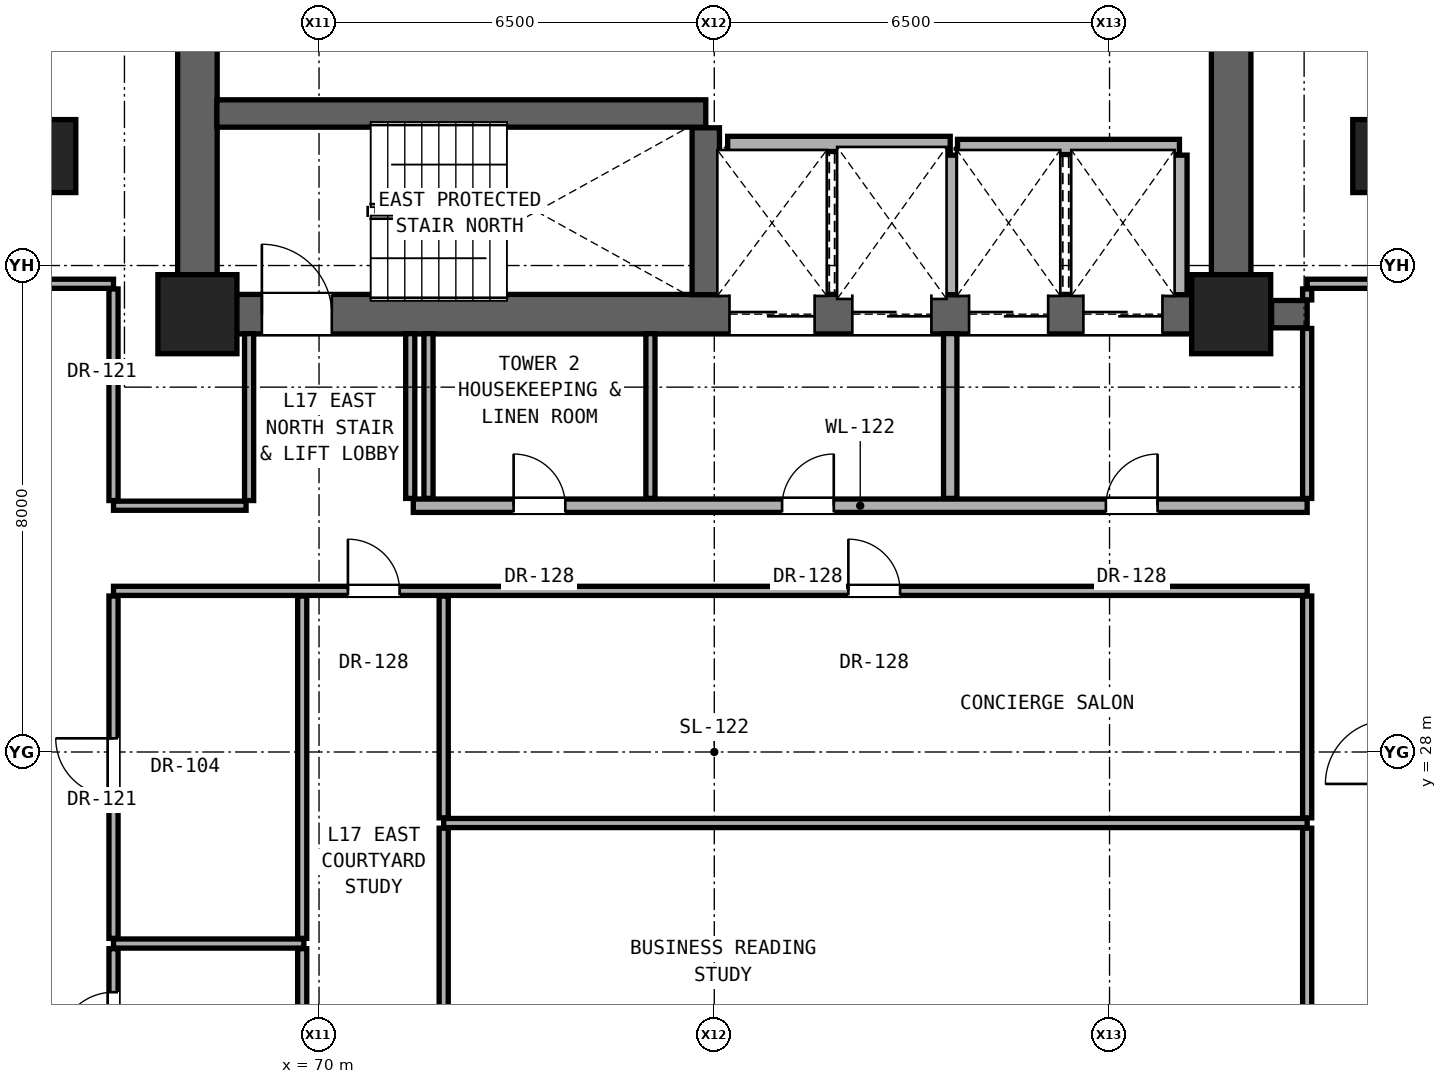
"""IFC4 building model, lengths in metres.
Left out: names, types, materials, properties, quantities, classifications, styles, units other than length and angle.
Written with IfcOpenShell. Run it as: python <this file> out.ifc"""

import sys

from ifc_helpers import new_model, si_unit, direction, frame, frame_2d, origin, origin_2d, place, context, subcontext, project, spatial, rectangle, extrude, element, fill, save


model = new_model("IFC4")
c1 = context("Model", 3, precision=1e-05, world=origin(), true_north=direction((0.0, 1.0)))
c2 = subcontext(c1, "Body", "Model", "MODEL_VIEW")
j1 = project(units=[si_unit("LENGTHUNIT", "METRE"), si_unit("PLANEANGLEUNIT", "RADIAN")], contexts=[c1])
p1 = place(None, origin())
s1 = spatial("IfcSite", under=j1, at=p1, CompositionType="ELEMENT")
p2 = place(p1, origin())
s2 = spatial("IfcBuilding", under=s1, at=p2, CompositionType="ELEMENT")
p3 = place(p2, frame((0.0, 0.0, 62.0)))
s3 = spatial("IfcBuildingStorey", under=s2, at=p3, CompositionType="ELEMENT", Elevation=62.0)
for number, where, z_axis, x_axis in (
    (1, (68.0, 35.2, 0.0), (0.0, 0.0, 1.0), (1.0, 0.0, 0.0)),
    (2, (85.0, 35.2, 0.0), (0.0, 0.0, 1.0), (1.0, 0.0, 0.0)),
):
    element("IfcColumn", number, at=place(p3, frame(where, z_axis=z_axis, x_axis=x_axis)), inside=s3, PredefinedType="COLUMN", context=c2, shape_type="SweptSolid", body=[
        extrude(rectangle(XDim=1.3, YDim=1.3, at=origin_2d()), origin(), (0.0, 0.0, 1.0), 3.3),
    ])
for number, where, z_axis, x_axis in (
    (3, (65.6, 37.8, 0.0), (0.0, 0.0, 1.0), (1.0, 0.0, 0.0)),
    (4, (87.4, 37.8, 0.0), (0.0, 0.0, 1.0), (1.0, 0.0, 0.0)),
):
    element("IfcColumn", number, at=place(p3, frame(where, z_axis=z_axis, x_axis=x_axis)), inside=s3, PredefinedType="PILASTER", context=c2, shape_type="SweptSolid", body=[
        extrude(rectangle(XDim=0.8, YDim=1.2, at=origin_2d()), origin(), (0.0, 0.0, 1.0), 3.3),
    ])
for number, where, z_axis, x_axis in (
    (5, (68.0, 35.2, 0.0), (0.0, 0.0, 1.0), (0.0, 1.0, 0.0)),
    (6, (85.0, 35.2, 0.0), (0.0, 0.0, 1.0), (0.0, 1.0, 0.0)),
):
    element("IfcWall", number, at=place(p3, frame(where, z_axis=z_axis, x_axis=x_axis)), inside=s3, PredefinedType="SHEAR", context=c2, shape_type="SweptSolid", body=[
        extrude(rectangle(XDim=5.6, YDim=0.65, at=frame_2d((2.8, 0.0))), origin(), (0.0, 0.0, 1.0), 3.06),
    ])
p4 = place(p3, frame((68.0, 35.2, 0.0), z_axis=(0.0, 0.0, 1.0), x_axis=(1.0, 0.0, 0.0)))
e7 = element("IfcWall", 7, at=p4, inside=s3, PredefinedType="SHEAR", context=c2, shape_type="SweptSolid", body=[
    extrude(rectangle(XDim=17.0, YDim=0.65, at=frame_2d((8.5, 0.0))), origin(), (0.0, 0.0, 1.0), 3.06),
])
p5 = place(p4, frame((1.06, 0.0, 0.0)))
e8 = element("IfcOpeningElement", 8, at=p5, cuts=e7, PredefinedType="OPENING", context=c2, shape_type="SweptSolid", body=[
    extrude(rectangle(XDim=1.15, YDim=2.2, at=frame_2d((0.575, 1.1))), frame((0.0, 0.335, 0.0), z_axis=(0.0, -1.0, 0.0), x_axis=(1.0, 0.0, 0.0)), (0.0, 0.0, 1.0), 0.67),
])
p6 = place(p4, frame((8.75, 0.0, 0.0)))
e9 = element("IfcOpeningElement", 9, at=p6, cuts=e7, PredefinedType="OPENING", context=c2, shape_type="SweptSolid", body=[
    extrude(rectangle(XDim=1.4, YDim=2.35, at=frame_2d((0.7, 1.175))), frame((0.0, 0.335, 0.0), z_axis=(0.0, -1.0, 0.0), x_axis=(1.0, 0.0, 0.0)), (0.0, 0.0, 1.0), 0.67),
])
p7 = place(p4, frame((10.77, 0.0, 0.0)))
e10 = element("IfcOpeningElement", 10, at=p7, cuts=e7, PredefinedType="OPENING", context=c2, shape_type="SweptSolid", body=[
    extrude(rectangle(XDim=1.3, YDim=2.3, at=frame_2d((0.65, 1.15))), frame((0.0, 0.335, 0.0), z_axis=(0.0, -1.0, 0.0), x_axis=(1.0, 0.0, 0.0)), (0.0, 0.0, 1.0), 0.67),
])
p8 = place(p4, frame((12.69, 0.0, 0.0)))
e11 = element("IfcOpeningElement", 11, at=p8, cuts=e7, PredefinedType="OPENING", context=c2, shape_type="SweptSolid", body=[
    extrude(rectangle(XDim=1.3, YDim=2.3, at=frame_2d((0.65, 1.15))), frame((0.0, 0.335, 0.0), z_axis=(0.0, -1.0, 0.0), x_axis=(1.0, 0.0, 0.0)), (0.0, 0.0, 1.0), 0.67),
])
p9 = place(p4, frame((14.57, 0.0, 0.0)))
e12 = element("IfcOpeningElement", 12, at=p9, cuts=e7, PredefinedType="OPENING", context=c2, shape_type="SweptSolid", body=[
    extrude(rectangle(XDim=1.3, YDim=2.3, at=frame_2d((0.65, 1.15))), frame((0.0, 0.335, 0.0), z_axis=(0.0, -1.0, 0.0), x_axis=(1.0, 0.0, 0.0)), (0.0, 0.0, 1.0), 0.67),
])
p10 = place(p3, frame((66.62, 24.85, 0.0), z_axis=(0.0, 0.0, 1.0), x_axis=(1.0, 0.0, 0.0)))
e13 = element("IfcWall", 13, at=p10, inside=s3, PredefinedType="PARTITIONING", context=c2, shape_type="SweptSolid", body=[
    extrude(rectangle(XDim=3.13, YDim=0.15, at=frame_2d((1.565, 0.0))), origin(), (0.0, 0.0, 1.0), 2.125),
])
p11 = place(p3, frame((72.05, 26.832, 0.0), z_axis=(0.0, 0.0, 1.0), x_axis=(1.0, 0.0, 0.0)))
e14 = element("IfcWall", 14, at=p11, inside=s3, PredefinedType="PARTITIONING", context=c2, shape_type="SweptSolid", body=[
    extrude(rectangle(XDim=14.2, YDim=0.15, at=frame_2d((7.1, 0.0))), origin(), (0.0, 0.0, 1.0), 2.125),
])
p12 = place(p3, frame((66.62, 30.65, 0.0), z_axis=(0.0, 0.0, 1.0), x_axis=(1.0, 0.0, 0.0)))
e15 = element("IfcWall", 15, at=p12, inside=s3, PredefinedType="PARTITIONING", context=c2, shape_type="SweptSolid", body=[
    extrude(rectangle(XDim=19.63, YDim=0.15, at=frame_2d((9.815, 0.0))), origin(), (0.0, 0.0, 1.0), 2.125),
])
p13 = place(p12, frame((3.855, 0.0, 0.0)))
e16 = element("IfcOpeningElement", 16, at=p13, cuts=e15, PredefinedType="OPENING", context=c2, shape_type="SweptSolid", body=[
    extrude(rectangle(XDim=0.85, YDim=2.01, at=frame_2d((0.425, 1.005))), frame((0.0, 0.085, 0.0), z_axis=(0.0, -1.0, 0.0), x_axis=(1.0, 0.0, 0.0)), (0.0, 0.0, 1.0), 0.17),
])
p14 = place(p12, frame((12.085, 0.0, 0.0)))
e17 = element("IfcOpeningElement", 17, at=p14, cuts=e15, PredefinedType="OPENING", context=c2, shape_type="SweptSolid", body=[
    extrude(rectangle(XDim=0.85, YDim=2.01, at=frame_2d((0.425, 1.005))), frame((0.0, 0.085, 0.0), z_axis=(0.0, -1.0, 0.0), x_axis=(1.0, 0.0, 0.0)), (0.0, 0.0, 1.0), 0.17),
])
p15 = place(p3, frame((66.62, 32.05, 0.0), z_axis=(0.0, 0.0, 1.0), x_axis=(1.0, 0.0, 0.0)))
e18 = element("IfcWall", 18, at=p15, inside=s3, PredefinedType="PARTITIONING", context=c2, shape_type="SweptSolid", body=[
    extrude(rectangle(XDim=2.18, YDim=0.15, at=frame_2d((1.09, 0.0))), origin(), (0.0, 0.0, 1.0), 2.125),
])
p16 = place(p3, frame((71.55, 32.05, 0.0), z_axis=(0.0, 0.0, 1.0), x_axis=(1.0, 0.0, 0.0)))
e19 = element("IfcWall", 19, at=p16, inside=s3, PredefinedType="SOLIDWALL", context=c2, shape_type="SweptSolid", body=[
    extrude(rectangle(XDim=14.7, YDim=0.22, at=frame_2d((7.35, 0.0))), origin(), (0.0, 0.0, 1.0), 2.125),
])
p17 = place(p16, frame((11.39, 0.0, 0.0)))
e20 = element("IfcOpeningElement", 20, at=p17, cuts=e19, PredefinedType="OPENING", context=c2, shape_type="SweptSolid", body=[
    extrude(rectangle(XDim=0.85, YDim=2.01, at=frame_2d((0.425, 1.005))), frame((0.0, 0.12, 0.0), z_axis=(0.0, -1.0, 0.0), x_axis=(1.0, 0.0, 0.0)), (0.0, 0.0, 1.0), 0.24),
])
p18 = place(p16, frame((6.065, 0.0, 0.0)))
e21 = element("IfcOpeningElement", 21, at=p18, cuts=e19, PredefinedType="OPENING", context=c2, shape_type="SweptSolid", body=[
    extrude(rectangle(XDim=0.85, YDim=2.01, at=frame_2d((0.425, 1.005))), frame((0.0, 0.12, 0.0), z_axis=(0.0, -1.0, 0.0), x_axis=(1.0, 0.0, 0.0)), (0.0, 0.0, 1.0), 0.24),
])
p19 = place(p16, frame((1.65, 0.0, 0.0)))
e22 = element("IfcOpeningElement", 22, at=p19, cuts=e19, PredefinedType="OPENING", context=c2, shape_type="SweptSolid", body=[
    extrude(rectangle(XDim=0.85, YDim=2.01, at=frame_2d((0.425, 1.005))), frame((0.0, 0.12, 0.0), z_axis=(0.0, -1.0, 0.0), x_axis=(1.0, 0.0, 0.0)), (0.0, 0.0, 1.0), 0.24),
])
p20 = place(p3, frame((85.665, 35.2, 0.0), z_axis=(0.0, 0.0, 1.0), x_axis=(1.0, 0.0, 0.0)))
e23 = element("IfcWall", 23, at=p20, inside=s3, PredefinedType="SHEAR", context=c2, shape_type="SweptSolid", body=[
    extrude(rectangle(XDim=0.585, YDim=0.45, at=frame_2d((0.292, 0.0))), origin(), (0.0, 0.0, 1.0), 3.06),
])
p21 = place(p3, frame((65.25, 35.7, 0.0), z_axis=(0.0, 0.0, 1.0), x_axis=(1.0, 0.0, 0.0)))
e24 = element("IfcWall", 24, at=p21, inside=s3, PredefinedType="PARTITIONING", context=c2, shape_type="SweptSolid", body=[
    extrude(rectangle(XDim=1.37, YDim=0.15, at=frame_2d((0.685, 0.0))), origin(), (0.0, 0.0, 1.0), 3.06),
])
p22 = place(p3, frame((86.25, 35.7, 0.0), z_axis=(0.0, 0.0, 1.0), x_axis=(1.0, 0.0, 0.0)))
e25 = element("IfcWall", 25, at=p22, inside=s3, PredefinedType="PARTITIONING", context=c2, shape_type="SweptSolid", body=[
    extrude(rectangle(XDim=1.35, YDim=0.15, at=frame_2d((0.675, 0.0))), origin(), (0.0, 0.0, 1.0), 3.06),
])
p23 = place(p3, frame((80.5, 37.95, 0.0), z_axis=(0.0, 0.0, 1.0), x_axis=(1.0, 0.0, 0.0)))
e26 = element("IfcWall", 26, at=p23, inside=s3, PredefinedType="SOLIDWALL", context=c2, shape_type="SweptSolid", body=[
    extrude(rectangle(XDim=3.65, YDim=0.25, at=frame_2d((1.825, 0.0))), origin(), (0.0, 0.0, 1.0), 3.06),
])
p24 = place(p3, frame((76.72, 38.0, 0.0), z_axis=(0.0, 0.0, 1.0), x_axis=(1.0, 0.0, 0.0)))
e27 = element("IfcWall", 27, at=p24, inside=s3, PredefinedType="SOLIDWALL", context=c2, shape_type="SweptSolid", body=[
    extrude(rectangle(XDim=3.66, YDim=0.25, at=frame_2d((1.83, 0.0))), origin(), (0.0, 0.0, 1.0), 3.06),
])
p25 = place(p3, frame((68.32, 38.5, 0.0), z_axis=(0.0, 0.0, 1.0), x_axis=(1.0, 0.0, 0.0)))
e28 = element("IfcWall", 28, at=p25, inside=s3, PredefinedType="SHEAR", context=c2, shape_type="SweptSolid", body=[
    extrude(rectangle(XDim=8.04, YDim=0.45, at=frame_2d((4.02, 0.0))), origin(), (0.0, 0.0, 1.0), 3.06),
])
p26 = place(p3, frame((66.62, 22.435, 0.0), z_axis=(0.0, 0.0, 1.0), x_axis=(0.0, 1.0, 0.0)))
e29 = element("IfcWall", 29, at=p26, inside=s3, PredefinedType="PARTITIONING", context=c2, shape_type="SweptSolid", body=[
    extrude(rectangle(XDim=2.33, YDim=0.15, at=frame_2d((1.165, 0.0))), origin(), (0.0, 0.0, 1.0), 3.06),
])
p27 = place(p26, frame((0.715, 0.0, 0.0)))
e30 = element("IfcOpeningElement", 30, at=p27, cuts=e29, PredefinedType="OPENING", context=c2, shape_type="SweptSolid", body=[
    extrude(rectangle(XDim=0.9, YDim=2.1, at=frame_2d((0.45, 1.05))), frame((0.0, 0.085, 0.0), z_axis=(0.0, -1.0, 0.0), x_axis=(1.0, 0.0, 0.0)), (0.0, 0.0, 1.0), 0.17),
])
p28 = place(p3, frame((66.62, 24.935, 0.0), z_axis=(0.0, 0.0, 1.0), x_axis=(0.0, 1.0, 0.0)))
e31 = element("IfcWall", 31, at=p28, inside=s3, PredefinedType="PARTITIONING", context=c2, shape_type="SweptSolid", body=[
    extrude(rectangle(XDim=5.63, YDim=0.15, at=frame_2d((2.815, 0.0))), origin(), (0.0, 0.0, 1.0), 2.279),
])
p29 = place(p28, frame((2.34, 0.0, 0.0)))
e32 = element("IfcOpeningElement", 32, at=p29, cuts=e31, PredefinedType="OPENING", context=c2, shape_type="SweptSolid", body=[
    extrude(rectangle(XDim=0.95, YDim=2.15, at=frame_2d((0.475, 1.075))), frame((0.0, 0.085, 0.0), z_axis=(0.0, -1.0, 0.0), x_axis=(1.0, 0.0, 0.0)), (0.0, 0.0, 1.0), 0.17),
])
p30 = place(p3, frame((66.62, 32.135, 0.0), z_axis=(0.0, 0.0, 1.0), x_axis=(0.0, 1.0, 0.0)))
e33 = element("IfcWall", 33, at=p30, inside=s3, PredefinedType="PARTITIONING", context=c2, shape_type="SweptSolid", body=[
    extrude(rectangle(XDim=3.48, YDim=0.15, at=frame_2d((1.74, 0.0))), origin(), (0.0, 0.0, 1.0), 2.452),
])
p31 = place(p3, frame((68.85, 32.135, 0.0), z_axis=(0.0, 0.0, 1.0), x_axis=(0.0, 1.0, 0.0)))
e34 = element("IfcWall", 34, at=p31, inside=s3, PredefinedType="PARTITIONING", context=c2, shape_type="SweptSolid", body=[
    extrude(rectangle(XDim=2.745, YDim=0.15, at=frame_2d((1.373, 0.0))), origin(), (0.0, 0.0, 1.0), 3.06),
])
p32 = place(p3, frame((69.723, 22.435, 0.0), z_axis=(0.0, 0.0, 1.0), x_axis=(0.0, 1.0, 0.0)))
e35 = element("IfcWall", 35, at=p32, inside=s3, PredefinedType="PARTITIONING", context=c2, shape_type="SweptSolid", body=[
    extrude(rectangle(XDim=2.33, YDim=0.15, at=frame_2d((1.165, 0.0))), origin(), (0.0, 0.0, 1.0), 3.06),
])
p33 = place(p3, frame((69.723, 24.935, 0.0), z_axis=(0.0, 0.0, 1.0), x_axis=(0.0, 1.0, 0.0)))
e36 = element("IfcWall", 36, at=p33, inside=s3, PredefinedType="PARTITIONING", context=c2, shape_type="SweptSolid", body=[
    extrude(rectangle(XDim=5.63, YDim=0.15, at=frame_2d((2.815, 0.0))), origin(), (0.0, 0.0, 1.0), 2.125),
])
for number, where, z_axis, x_axis in (
    (37, (71.5, 32.17, 0.0), (0.0, 0.0, 1.0), (0.0, 1.0, 0.0)),
    (38, (71.8, 32.17, 0.0), (0.0, 0.0, 1.0), (0.0, 1.0, 0.0)),
):
    element("IfcWall", number, at=place(p3, frame(where, z_axis=z_axis, x_axis=x_axis)), inside=s3, PredefinedType="PARTITIONING", context=c2, shape_type="SweptSolid", body=[
        extrude(rectangle(XDim=2.71, YDim=0.15, at=frame_2d((1.355, 0.0))), origin(), (0.0, 0.0, 1.0), 3.06),
    ])
p34 = place(p3, frame((72.05, 22.435, 0.0), z_axis=(0.0, 0.0, 1.0), x_axis=(0.0, 1.0, 0.0)))
e39 = element("IfcWall", 39, at=p34, inside=s3, PredefinedType="PARTITIONING", context=c2, shape_type="SweptSolid", body=[
    extrude(rectangle(XDim=4.312, YDim=0.15, at=frame_2d((2.156, 0.0))), origin(), (0.0, 0.0, 1.0), 2.589),
])
p35 = place(p3, frame((72.05, 26.917, 0.0), z_axis=(0.0, 0.0, 1.0), x_axis=(0.0, 1.0, 0.0)))
e40 = element("IfcWall", 40, at=p35, inside=s3, PredefinedType="PARTITIONING", context=c2, shape_type="SweptSolid", body=[
    extrude(rectangle(XDim=3.648, YDim=0.15, at=frame_2d((1.824, 0.0))), origin(), (0.0, 0.0, 1.0), 2.125),
])
p36 = place(p3, frame((75.45, 32.17, 0.0), z_axis=(0.0, 0.0, 1.0), x_axis=(0.0, 1.0, 0.0)))
e41 = element("IfcWall", 41, at=p36, inside=s3, PredefinedType="PARTITIONING", context=c2, shape_type="SweptSolid", body=[
    extrude(rectangle(XDim=2.71, YDim=0.15, at=frame_2d((1.355, 0.0))), origin(), (0.0, 0.0, 1.0), 3.06),
])
p37 = place(p3, frame((76.36, 35.52, 0.0), z_axis=(0.0, 0.0, 1.0), x_axis=(0.0, 1.0, 0.0)))
e42 = element("IfcWall", 42, at=p37, inside=s3, PredefinedType="SHEAR", context=c2, shape_type="SweptSolid", body=[
    extrude(rectangle(XDim=2.745, YDim=0.45, at=frame_2d((1.373, 0.0))), origin(), (0.0, 0.0, 1.0), 3.06),
])
p38 = place(p3, frame((80.38, 32.17, 0.0), z_axis=(0.0, 0.0, 1.0), x_axis=(0.0, 1.0, 0.0)))
e43 = element("IfcWall", 43, at=p38, inside=s3, PredefinedType="SOLIDWALL", context=c2, shape_type="SweptSolid", body=[
    extrude(rectangle(XDim=2.71, YDim=0.22, at=frame_2d((1.355, 0.0))), origin(), (0.0, 0.0, 1.0), 3.06),
])
for number, where, z_axis, x_axis in (
    (44, (80.38, 35.52, 0.0), (0.0, 0.0, 1.0), (0.0, 1.0, 0.0)),
    (45, (84.15, 35.52, 0.0), (0.0, 0.0, 1.0), (0.0, 1.0, 0.0)),
):
    element("IfcWall", number, at=place(p3, frame(where, z_axis=z_axis, x_axis=x_axis)), inside=s3, PredefinedType="SOLIDWALL", context=c2, shape_type="SweptSolid", body=[
        extrude(rectangle(XDim=2.295, YDim=0.25, at=frame_2d((1.147, 0.0))), origin(), (0.0, 0.0, 1.0), 3.06),
    ])
p39 = place(p3, frame((86.25, 22.435, 0.0), z_axis=(0.0, 0.0, 1.0), x_axis=(0.0, 1.0, 0.0)))
e46 = element("IfcWall", 46, at=p39, inside=s3, PredefinedType="PARTITIONING", context=c2, shape_type="SweptSolid", body=[
    extrude(rectangle(XDim=4.312, YDim=0.15, at=frame_2d((2.156, 0.0))), origin(), (0.0, 0.0, 1.0), 3.06),
])
p40 = place(p3, frame((86.25, 26.917, 0.0), z_axis=(0.0, 0.0, 1.0), x_axis=(0.0, 1.0, 0.0)))
e47 = element("IfcWall", 47, at=p40, inside=s3, PredefinedType="PARTITIONING", context=c2, shape_type="SweptSolid", body=[
    extrude(rectangle(XDim=3.648, YDim=0.15, at=frame_2d((1.824, 0.0))), origin(), (0.0, 0.0, 1.0), 2.279),
])
p41 = place(p3, frame((86.25, 32.17, 0.0), z_axis=(0.0, 0.0, 1.0), x_axis=(0.0, 1.0, 0.0)))
e48 = element("IfcWall", 48, at=p41, inside=s3, PredefinedType="PARTITIONING", context=c2, shape_type="SweptSolid", body=[
    extrude(rectangle(XDim=2.795, YDim=0.15, at=frame_2d((1.397, 0.0))), origin(), (0.0, 0.0, 1.0), 2.452),
])
p42 = place(p3, frame((86.25, 35.435, 0.0), z_axis=(0.0, 0.0, 1.0), x_axis=(0.0, 1.0, 0.0)))
e49 = element("IfcWall", 49, at=p42, inside=s3, PredefinedType="PARTITIONING", context=c2, shape_type="SweptSolid", body=[
    extrude(rectangle(XDim=0.18, YDim=0.15, at=frame_2d((0.09, 0.0))), origin(), (0.0, 0.0, 1.0), 2.452),
])
p43 = place(p17, origin())
e50 = element("IfcDoor", 50, at=p43, inside=s3, OperationType="SINGLE_SWING_RIGHT", PredefinedType="DOOR", context=c2, shape_type="SweptSolid", body=[
    extrude(rectangle(XDim=0.85, YDim=2.01, at=frame_2d((0.425, 1.005))), frame((0.0, 0.025, 0.0), z_axis=(0.0, -1.0, 0.0), x_axis=(1.0, 0.0, 0.0)), (0.0, 0.0, 1.0), 0.05),
])
fill(e20, e50)
p44 = place(p5, origin())
e51 = element("IfcDoor", 51, at=p44, inside=s3, OperationType="SINGLE_SWING_LEFT", PredefinedType="DOOR", context=c2, shape_type="SweptSolid", body=[
    extrude(rectangle(XDim=1.15, YDim=2.2, at=frame_2d((0.575, 1.1))), frame((0.0, 0.025, 0.0), z_axis=(0.0, -1.0, 0.0), x_axis=(1.0, 0.0, 0.0)), (0.0, 0.0, 1.0), 0.05),
])
fill(e8, e51)
p45 = place(p18, origin())
e52 = element("IfcDoor", 52, at=p45, inside=s3, OperationType="SINGLE_SWING_RIGHT", PredefinedType="DOOR", context=c2, shape_type="SweptSolid", body=[
    extrude(rectangle(XDim=0.85, YDim=2.01, at=frame_2d((0.425, 1.005))), frame((0.0, 0.025, 0.0), z_axis=(0.0, -1.0, 0.0), x_axis=(1.0, 0.0, 0.0)), (0.0, 0.0, 1.0), 0.05),
])
fill(e21, e52)
p46 = place(p19, origin())
e53 = element("IfcDoor", 53, at=p46, inside=s3, OperationType="SINGLE_SWING_LEFT", PredefinedType="DOOR", context=c2, shape_type="SweptSolid", body=[
    extrude(rectangle(XDim=0.85, YDim=2.01, at=frame_2d((0.425, 1.005))), frame((0.0, 0.025, 0.0), z_axis=(0.0, -1.0, 0.0), x_axis=(1.0, 0.0, 0.0)), (0.0, 0.0, 1.0), 0.05),
])
fill(e22, e53)
p47 = place(p27, origin())
e54 = element("IfcDoor", 54, at=p47, inside=s3, OperationType="SINGLE_SWING_LEFT", PredefinedType="DOOR", context=c2, shape_type="SweptSolid", body=[
    extrude(rectangle(XDim=0.9, YDim=2.1, at=frame_2d((0.45, 1.05))), frame((0.0, 0.025, 0.0), z_axis=(0.0, -1.0, 0.0), x_axis=(1.0, 0.0, 0.0)), (0.0, 0.0, 1.0), 0.05),
])
fill(e30, e54)
p48 = place(p29, origin())
e55 = element("IfcDoor", 55, at=p48, inside=s3, OperationType="SINGLE_SWING_RIGHT", PredefinedType="DOOR", context=c2, shape_type="SweptSolid", body=[
    extrude(rectangle(XDim=0.95, YDim=2.15, at=frame_2d((0.475, 1.075))), frame((0.0, 0.025, 0.0), z_axis=(0.0, -1.0, 0.0), x_axis=(1.0, 0.0, 0.0)), (0.0, 0.0, 1.0), 0.05),
])
fill(e32, e55)
p49 = place(p13, origin())
e56 = element("IfcDoor", 56, at=p49, inside=s3, OperationType="SINGLE_SWING_LEFT", PredefinedType="DOOR", context=c2, shape_type="SweptSolid", body=[
    extrude(rectangle(XDim=0.85, YDim=2.01, at=frame_2d((0.425, 1.005))), frame((0.0, 0.025, 0.0), z_axis=(0.0, -1.0, 0.0), x_axis=(1.0, 0.0, 0.0)), (0.0, 0.0, 1.0), 0.05),
])
fill(e16, e56)
p50 = place(p14, origin())
e57 = element("IfcDoor", 57, at=p50, inside=s3, OperationType="SINGLE_SWING_LEFT", PredefinedType="DOOR", context=c2, shape_type="SweptSolid", body=[
    extrude(rectangle(XDim=0.85, YDim=2.01, at=frame_2d((0.425, 1.005))), frame((0.0, 0.025, 0.0), z_axis=(0.0, -1.0, 0.0), x_axis=(1.0, 0.0, 0.0)), (0.0, 0.0, 1.0), 0.05),
])
fill(e17, e57)
p51 = place(p6, origin())
e58 = element("IfcDoor", 58, at=p51, inside=s3, OperationType="DOUBLE_DOOR_SLIDING", PredefinedType="DOOR", context=c2, shape_type="SweptSolid", body=[
    extrude(rectangle(XDim=1.4, YDim=2.35, at=frame_2d((0.7, 1.175))), frame((0.0, 0.025, 0.0), z_axis=(0.0, -1.0, 0.0), x_axis=(1.0, 0.0, 0.0)), (0.0, 0.0, 1.0), 0.05),
])
fill(e9, e58)
p52 = place(p7, origin())
e59 = element("IfcDoor", 59, at=p52, inside=s3, OperationType="DOUBLE_DOOR_SLIDING", PredefinedType="DOOR", context=c2, shape_type="SweptSolid", body=[
    extrude(rectangle(XDim=1.3, YDim=2.3, at=frame_2d((0.65, 1.15))), frame((0.0, 0.025, 0.0), z_axis=(0.0, -1.0, 0.0), x_axis=(1.0, 0.0, 0.0)), (0.0, 0.0, 1.0), 0.05),
])
fill(e10, e59)
p53 = place(p8, origin())
e60 = element("IfcDoor", 60, at=p53, inside=s3, OperationType="DOUBLE_DOOR_SLIDING", PredefinedType="DOOR", context=c2, shape_type="SweptSolid", body=[
    extrude(rectangle(XDim=1.3, YDim=2.3, at=frame_2d((0.65, 1.15))), frame((0.0, 0.025, 0.0), z_axis=(0.0, -1.0, 0.0), x_axis=(1.0, 0.0, 0.0)), (0.0, 0.0, 1.0), 0.05),
])
fill(e11, e60)
p54 = place(p9, origin())
e61 = element("IfcDoor", 61, at=p54, inside=s3, OperationType="DOUBLE_DOOR_SLIDING", PredefinedType="DOOR", context=c2, shape_type="SweptSolid", body=[
    extrude(rectangle(XDim=1.3, YDim=2.3, at=frame_2d((0.65, 1.15))), frame((0.0, 0.025, 0.0), z_axis=(0.0, -1.0, 0.0), x_axis=(1.0, 0.0, 0.0)), (0.0, 0.0, 1.0), 0.05),
])
fill(e12, e61)
save(model, sys.argv[1])
